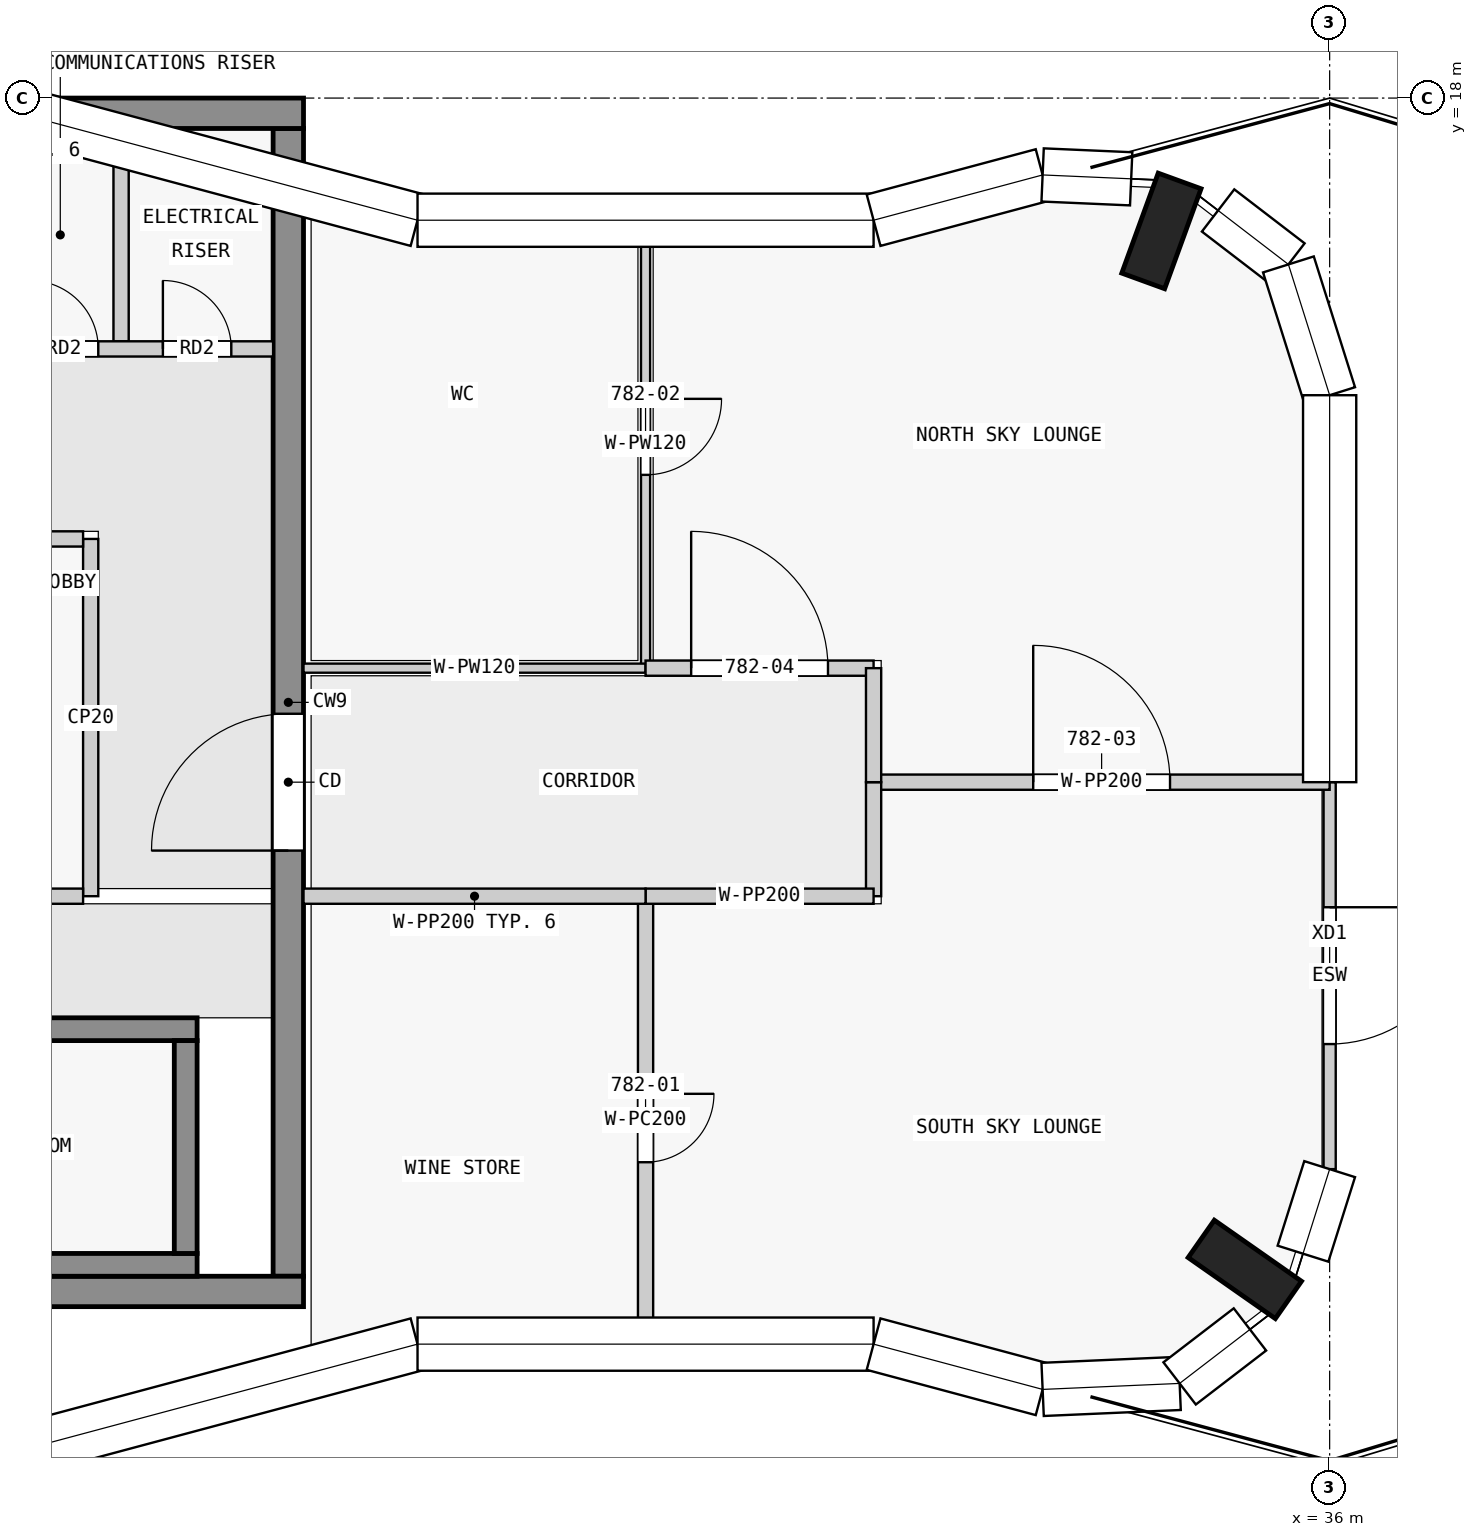
"""IFC4 building model, lengths in metres.
Left out: names, types, materials, properties, quantities, classifications, styles, units other than length and angle.
Written with IfcOpenShell. Run it as: python <this file> out.ifc"""

import sys

from ifc_helpers import new_model, si_unit, direction, frame, frame_2d, origin, origin_2d, place, context, subcontext, project, spatial, rectangle, extrude, element, fill, save


model = new_model("IFC4")
c1 = context("Model", 3, precision=1e-05, world=origin(), true_north=direction((0.0, 1.0)))
c2 = subcontext(c1, "Body", "Model", "MODEL_VIEW")
j1 = project(units=[si_unit("LENGTHUNIT", "METRE"), si_unit("PLANEANGLEUNIT", "RADIAN")], contexts=[c1])
p1 = place(None, origin())
s1 = spatial("IfcSite", under=j1, at=p1, CompositionType="ELEMENT")
p2 = place(p1, origin())
s2 = spatial("IfcBuilding", under=s1, at=p2, CompositionType="ELEMENT")
p3 = place(p2, frame((0.0, 0.0, 294.9)))
s3 = spatial("IfcBuildingStorey", under=s2, at=p3, CompositionType="ELEMENT", Elevation=294.9)
for number, where, z_axis, x_axis in (
    (1, (34.884, 2.59, 0.0), (0.0, 0.0, 1.0), (0.574, 0.819, 0.0)),
    (2, (33.787, 16.252, 0.0), (0.0, 0.0, 1.0), (-0.94, 0.342, 0.0)),
):
    element("IfcColumn", number, at=place(p3, frame(where, z_axis=z_axis, x_axis=x_axis)), inside=s3, PredefinedType="COLUMN", context=c2, shape_type="SweptSolid", body=[
        extrude(rectangle(XDim=0.6, YDim=1.4, at=origin_2d()), origin(), (0.0, 0.0, 1.0), 3.5),
    ])
for number, where, z_axis, x_axis in (
    (3, (1.9, 2.3, 0.0), (0.0, 0.0, 1.0), (1.0, 0.0, 0.0)),
    (4, (1.9, 17.8, 0.0), (0.0, 0.0, 1.0), (1.0, 0.0, 0.0)),
):
    element("IfcWall", number, at=place(p3, frame(where, z_axis=z_axis, x_axis=x_axis)), inside=s3, PredefinedType="SHEAR", context=c2, shape_type="SweptSolid", body=[
        extrude(rectangle(XDim=20.6, YDim=0.4, at=frame_2d((10.3, 0.0))), origin(), (0.0, 0.0, 1.0), 3.25),
    ])
p4 = place(p3, frame((22.3, 2.5, 0.0), z_axis=(0.0, 0.0, 1.0), x_axis=(0.0, 1.0, 0.0)))
e5 = element("IfcWall", 5, at=p4, inside=s3, PredefinedType="SHEAR", context=c2, shape_type="SweptSolid", body=[
    extrude(rectangle(XDim=15.1, YDim=0.4, at=frame_2d((7.55, 0.0))), origin(), (0.0, 0.0, 1.0), 3.25),
])
p5 = place(p4, frame((5.6, 0.0, 0.0)))
e6 = element("IfcOpeningElement", 6, at=p5, cuts=e5, PredefinedType="OPENING", context=c2, shape_type="SweptSolid", body=[
    extrude(rectangle(XDim=1.8, YDim=2.1, at=frame_2d((0.9, 1.05))), frame((0.0, 0.21, 0.0), z_axis=(0.0, -1.0, 0.0), x_axis=(1.0, 0.0, 0.0)), (0.0, 0.0, 1.0), 0.42),
])
p6 = place(p3, frame((13.3, 2.65, 0.0), z_axis=(0.0, 0.0, 1.0), x_axis=(1.0, 0.0, 0.0)))
e7 = element("IfcWall", 7, at=p6, inside=s3, PredefinedType="SHEAR", context=c2, shape_type="SweptSolid", body=[
    extrude(rectangle(XDim=7.8, YDim=0.3, at=frame_2d((3.9, 0.0))), origin(), (0.0, 0.0, 1.0), 3.25),
])
p7 = place(p3, frame((20.95, 2.8, 0.0), z_axis=(0.0, 0.0, 1.0), x_axis=(0.0, 1.0, 0.0)))
e8 = element("IfcWall", 8, at=p7, inside=s3, PredefinedType="SHEAR", context=c2, shape_type="SweptSolid", body=[
    extrude(rectangle(XDim=2.8, YDim=0.3, at=frame_2d((1.4, 0.0))), origin(), (0.0, 0.0, 1.0), 3.25),
])
p8 = place(p3, frame((2.3, 5.75, 0.0), z_axis=(0.0, 0.0, 1.0), x_axis=(1.0, 0.0, 0.0)))
e9 = element("IfcWall", 9, at=p8, inside=s3, PredefinedType="SHEAR", context=c2, shape_type="SweptSolid", body=[
    extrude(rectangle(XDim=18.8, YDim=0.3, at=frame_2d((9.4, 0.0))), origin(), (0.0, 0.0, 1.0), 3.25),
])
p9 = place(p8, frame((4.65, 0.0, 0.0)))
e10 = element("IfcOpeningElement", 10, at=p9, cuts=e9, PredefinedType="OPENING", context=c2, shape_type="SweptSolid", body=[
    extrude(rectangle(XDim=1.1, YDim=2.1, at=frame_2d((0.55, 1.05))), frame((0.0, 0.16, 0.0), z_axis=(0.0, -1.0, 0.0), x_axis=(1.0, 0.0, 0.0)), (0.0, 0.0, 1.0), 0.32),
])
p10 = place(p8, frame((0.45, 0.0, 0.0)))
e11 = element("IfcOpeningElement", 11, at=p10, cuts=e9, PredefinedType="OPENING", context=c2, shape_type="SweptSolid", body=[
    extrude(rectangle(XDim=1.1, YDim=2.1, at=frame_2d((0.55, 1.05))), frame((0.0, 0.16, 0.0), z_axis=(0.0, -1.0, 0.0), x_axis=(1.0, 0.0, 0.0)), (0.0, 0.0, 1.0), 0.32),
])
p11 = place(p8, frame((2.75, 0.0, 0.0)))
e12 = element("IfcOpeningElement", 12, at=p11, cuts=e9, PredefinedType="OPENING", context=c2, shape_type="SweptSolid", body=[
    extrude(rectangle(XDim=1.1, YDim=2.1, at=frame_2d((0.55, 1.05))), frame((0.0, 0.16, 0.0), z_axis=(0.0, -1.0, 0.0), x_axis=(1.0, 0.0, 0.0)), (0.0, 0.0, 1.0), 0.32),
])
p12 = place(p8, frame((11.95, 0.0, 0.0)))
e13 = element("IfcOpeningElement", 13, at=p12, cuts=e9, PredefinedType="OPENING", context=c2, shape_type="SweptSolid", body=[
    extrude(rectangle(XDim=0.9, YDim=2.1, at=frame_2d((0.45, 1.05))), frame((0.0, 0.16, 0.0), z_axis=(0.0, -1.0, 0.0), x_axis=(1.0, 0.0, 0.0)), (0.0, 0.0, 1.0), 0.32),
])
p13 = place(p8, frame((15.7, 0.0, 0.0)))
e14 = element("IfcOpeningElement", 14, at=p13, cuts=e9, PredefinedType="OPENING", context=c2, shape_type="SweptSolid", body=[
    extrude(rectangle(XDim=0.9, YDim=2.1, at=frame_2d((0.45, 1.05))), frame((0.0, 0.16, 0.0), z_axis=(0.0, -1.0, 0.0), x_axis=(1.0, 0.0, 0.0)), (0.0, 0.0, 1.0), 0.32),
])
p14 = place(p3, frame((36.0, 9.0, 0.0), z_axis=(0.0, 0.0, 1.0), x_axis=(0.0, -1.0, 0.0)))
e15 = element("IfcWall", 15, at=p14, inside=s3, PredefinedType="STANDARD", context=c2, shape_type="SweptSolid", body=[
    extrude(rectangle(XDim=5.091, YDim=0.16, at=frame_2d((2.545, 0.0))), origin(), (0.0, 0.0, 1.0), 3.25),
])
p15 = place(p14, frame((1.646, 0.0, 0.0)))
e16 = element("IfcOpeningElement", 16, at=p15, cuts=e15, PredefinedType="OPENING", context=c2, shape_type="SweptSolid", body=[
    extrude(rectangle(XDim=1.8, YDim=2.4, at=frame_2d((0.9, 1.2))), frame((0.0, 0.09, 0.0), z_axis=(0.0, -1.0, 0.0), x_axis=(1.0, 0.0, 0.0)), (0.0, 0.0, 1.0), 0.18),
])
p16 = place(p3, frame((10.9, 7.5, 0.0), z_axis=(0.0, 0.0, 1.0), x_axis=(1.0, 0.0, 0.0)))
e17 = element("IfcWall", 17, at=p16, inside=s3, PredefinedType="PARTITIONING", context=c2, shape_type="SweptSolid", body=[
    extrude(rectangle(XDim=8.7, YDim=0.2, at=frame_2d((4.35, 0.0))), origin(), (0.0, 0.0, 1.0), 3.25),
])
p17 = place(p3, frame((19.7, 7.5, 0.0), z_axis=(0.0, 0.0, 1.0), x_axis=(0.0, 1.0, 0.0)))
e18 = element("IfcWall", 18, at=p17, inside=s3, PredefinedType="PARTITIONING", context=c2, shape_type="SweptSolid", body=[
    extrude(rectangle(XDim=4.7, YDim=0.2, at=frame_2d((2.35, 0.0))), origin(), (0.0, 0.0, 1.0), 3.25),
])
p18 = place(p3, frame((10.9, 12.2, 0.0), z_axis=(0.0, 0.0, 1.0), x_axis=(1.0, 0.0, 0.0)))
e19 = element("IfcWall", 19, at=p18, inside=s3, PredefinedType="PARTITIONING", context=c2, shape_type="SweptSolid", body=[
    extrude(rectangle(XDim=8.7, YDim=0.2, at=frame_2d((4.35, 0.0))), origin(), (0.0, 0.0, 1.0), 3.25),
])
p19 = place(p18, frame((1.45, 0.0, 0.0)))
e20 = element("IfcOpeningElement", 20, at=p19, cuts=e19, PredefinedType="OPENING", context=c2, shape_type="SweptSolid", body=[
    extrude(rectangle(XDim=0.9, YDim=2.1, at=frame_2d((0.45, 1.05))), frame((0.0, 0.11, 0.0), z_axis=(0.0, -1.0, 0.0), x_axis=(1.0, 0.0, 0.0)), (0.0, 0.0, 1.0), 0.22),
])
p20 = place(p18, frame((5.9, 0.0, 0.0)))
e21 = element("IfcOpeningElement", 21, at=p20, cuts=e19, PredefinedType="OPENING", context=c2, shape_type="SweptSolid", body=[
    extrude(rectangle(XDim=0.9, YDim=2.1, at=frame_2d((0.45, 1.05))), frame((0.0, 0.11, 0.0), z_axis=(0.0, -1.0, 0.0), x_axis=(1.0, 0.0, 0.0)), (0.0, 0.0, 1.0), 0.22),
])
p21 = place(p3, frame((18.6, 14.7, 0.0), z_axis=(0.0, 0.0, 1.0), x_axis=(1.0, 0.0, 0.0)))
e22 = element("IfcWall", 22, at=p21, inside=s3, PredefinedType="PARTITIONING", context=c2, shape_type="SweptSolid", body=[
    extrude(rectangle(XDim=3.5, YDim=0.2, at=frame_2d((1.75, 0.0))), origin(), (0.0, 0.0, 1.0), 3.25),
])
p22 = place(p21, frame((0.3, 0.0, 0.0)))
e23 = element("IfcOpeningElement", 23, at=p22, cuts=e22, PredefinedType="OPENING", context=c2, shape_type="SweptSolid", body=[
    extrude(rectangle(XDim=0.9, YDim=2.1, at=frame_2d((0.45, 1.05))), frame((0.0, 0.11, 0.0), z_axis=(0.0, -1.0, 0.0), x_axis=(1.0, 0.0, 0.0)), (0.0, 0.0, 1.0), 0.22),
])
p23 = place(p21, frame((2.05, 0.0, 0.0)))
e24 = element("IfcOpeningElement", 24, at=p23, cuts=e22, PredefinedType="OPENING", context=c2, shape_type="SweptSolid", body=[
    extrude(rectangle(XDim=0.9, YDim=2.1, at=frame_2d((0.45, 1.05))), frame((0.0, 0.11, 0.0), z_axis=(0.0, -1.0, 0.0), x_axis=(1.0, 0.0, 0.0)), (0.0, 0.0, 1.0), 0.22),
])
p24 = place(p3, frame((20.1, 14.8, 0.0), z_axis=(0.0, 0.0, 1.0), x_axis=(0.0, 1.0, 0.0)))
e25 = element("IfcWall", 25, at=p24, inside=s3, PredefinedType="PARTITIONING", context=c2, shape_type="SweptSolid", body=[
    extrude(rectangle(XDim=2.8, YDim=0.2, at=frame_2d((1.4, 0.0))), origin(), (0.0, 0.0, 1.0), 3.25),
])
p25 = place(p3, frame((30.0, 9.0, 0.0), z_axis=(0.0, 0.0, 1.0), x_axis=(1.0, 0.0, 0.0)))
e26 = element("IfcWall", 26, at=p25, inside=s3, PredefinedType="PARTITIONING", context=c2, shape_type="SweptSolid", body=[
    extrude(rectangle(XDim=6.0, YDim=0.2, at=frame_2d((3.0, 0.0))), origin(), (0.0, 0.0, 1.0), 2.572),
])
p26 = place(p25, frame((2.1, 0.0, 0.0)))
e27 = element("IfcOpeningElement", 27, at=p26, cuts=e26, PredefinedType="OPENING", context=c2, shape_type="SweptSolid", body=[
    extrude(rectangle(XDim=1.8, YDim=2.1, at=frame_2d((0.9, 1.05))), frame((0.0, 0.11, 0.0), z_axis=(0.0, -1.0, 0.0), x_axis=(1.0, 0.0, 0.0)), (0.0, 0.0, 1.0), 0.22),
])
p27 = place(p3, frame((27.0, 16.393, 0.0), z_axis=(0.0, 0.0, 1.0), x_axis=(0.0, -1.0, 0.0)))
e28 = element("IfcWall", 28, at=p27, inside=s3, PredefinedType="PARTITIONING", context=c2, shape_type="SweptSolid", body=[
    extrude(rectangle(XDim=5.893, YDim=0.12, at=frame_2d((2.947, 0.0))), origin(), (0.0, 0.0, 1.0), 3.25),
])
p28 = place(p27, frame((2.35, 0.0, 0.0)))
e29 = element("IfcOpeningElement", 29, at=p28, cuts=e28, PredefinedType="OPENING", context=c2, shape_type="SweptSolid", body=[
    extrude(rectangle(XDim=1.0, YDim=2.1, at=frame_2d((0.5, 1.05))), frame((0.0, 0.07, 0.0), z_axis=(0.0, -1.0, 0.0), x_axis=(1.0, 0.0, 0.0)), (0.0, 0.0, 1.0), 0.14),
])
p29 = place(p3, frame((27.0, 7.5, 0.0), z_axis=(0.0, 0.0, 1.0), x_axis=(0.0, -1.0, 0.0)))
e30 = element("IfcWall", 30, at=p29, inside=s3, PredefinedType="PARTITIONING", context=c2, shape_type="SweptSolid", body=[
    extrude(rectangle(XDim=5.893, YDim=0.2, at=frame_2d((2.947, 0.0))), origin(), (0.0, 0.0, 1.0), 3.25),
])
p30 = place(p29, frame((2.6, 0.0, 0.0)))
e31 = element("IfcOpeningElement", 31, at=p30, cuts=e30, PredefinedType="OPENING", context=c2, shape_type="SweptSolid", body=[
    extrude(rectangle(XDim=0.9, YDim=2.1, at=frame_2d((0.45, 1.05))), frame((0.0, 0.11, 0.0), z_axis=(0.0, -1.0, 0.0), x_axis=(1.0, 0.0, 0.0)), (0.0, 0.0, 1.0), 0.22),
])
p31 = place(p3, frame((30.0, 9.0, 0.0), z_axis=(0.0, 0.0, 1.0), x_axis=(0.0, -1.0, 0.0)))
e32 = element("IfcWall", 32, at=p31, inside=s3, PredefinedType="PARTITIONING", context=c2, shape_type="SweptSolid", body=[
    extrude(rectangle(XDim=1.5, YDim=0.2, at=frame_2d((0.75, 0.0))), origin(), (0.0, 0.0, 1.0), 3.25),
])
p32 = place(p3, frame((30.0, 7.5, 0.0), z_axis=(0.0, 0.0, 1.0), x_axis=(-1.0, 0.0, 0.0)))
e33 = element("IfcWall", 33, at=p32, inside=s3, PredefinedType="PARTITIONING", context=c2, shape_type="SweptSolid", body=[
    extrude(rectangle(XDim=3.0, YDim=0.2, at=frame_2d((1.5, 0.0))), origin(), (0.0, 0.0, 1.0), 3.25),
])
p33 = place(p3, frame((22.5, 10.5, 0.0), z_axis=(0.0, 0.0, 1.0), x_axis=(1.0, 0.0, 0.0)))
e34 = element("IfcWall", 34, at=p33, inside=s3, PredefinedType="PARTITIONING", context=c2, shape_type="SweptSolid", body=[
    extrude(rectangle(XDim=4.5, YDim=0.12, at=frame_2d((2.25, 0.0))), origin(), (0.0, 0.0, 1.0), 3.25),
])
p34 = place(p3, frame((27.0, 7.5, 0.0), z_axis=(0.0, 0.0, 1.0), x_axis=(-1.0, 0.0, 0.0)))
e35 = element("IfcWall", 35, at=p34, inside=s3, PredefinedType="PARTITIONING", context=c2, shape_type="SweptSolid", body=[
    extrude(rectangle(XDim=4.5, YDim=0.2, at=frame_2d((2.25, 0.0))), origin(), (0.0, 0.0, 1.0), 3.25),
])
p35 = place(p3, frame((27.0, 10.5, 0.0), z_axis=(0.0, 0.0, 1.0), x_axis=(1.0, 0.0, 0.0)))
e36 = element("IfcWall", 36, at=p35, inside=s3, PredefinedType="PARTITIONING", context=c2, shape_type="SweptSolid", body=[
    extrude(rectangle(XDim=3.0, YDim=0.2, at=frame_2d((1.5, 0.0))), origin(), (0.0, 0.0, 1.0), 3.25),
])
p36 = place(p35, frame((0.6, 0.0, 0.0)))
e37 = element("IfcOpeningElement", 37, at=p36, cuts=e36, PredefinedType="OPENING", context=c2, shape_type="SweptSolid", body=[
    extrude(rectangle(XDim=1.8, YDim=2.1, at=frame_2d((0.9, 1.05))), frame((0.0, 0.11, 0.0), z_axis=(0.0, -1.0, 0.0), x_axis=(1.0, 0.0, 0.0)), (0.0, 0.0, 1.0), 0.22),
])
p37 = place(p3, frame((30.0, 10.5, 0.0), z_axis=(0.0, 0.0, 1.0), x_axis=(0.0, -1.0, 0.0)))
e38 = element("IfcWall", 38, at=p37, inside=s3, PredefinedType="PARTITIONING", context=c2, shape_type="SweptSolid", body=[
    extrude(rectangle(XDim=1.5, YDim=0.2, at=frame_2d((0.75, 0.0))), origin(), (0.0, 0.0, 1.0), 3.25),
])
p38 = place(p15, origin())
e39 = element("IfcDoor", 39, at=p38, inside=s3, OperationType="SINGLE_SWING_LEFT", PredefinedType="DOOR", context=c2, shape_type="SweptSolid", body=[
    extrude(rectangle(XDim=1.8, YDim=2.4, at=frame_2d((0.9, 1.2))), frame((0.0, 0.025, 0.0), z_axis=(0.0, -1.0, 0.0), x_axis=(1.0, 0.0, 0.0)), (0.0, 0.0, 1.0), 0.05),
])
fill(e16, e39)
p39 = place(p5, origin())
e40 = element("IfcDoor", 40, at=p39, inside=s3, OperationType="DOUBLE_DOOR_SINGLE_SWING", PredefinedType="DOOR", context=c2, shape_type="SweptSolid", body=[
    extrude(rectangle(XDim=1.8, YDim=2.1, at=frame_2d((0.9, 1.05))), frame((0.0, 0.025, 0.0), z_axis=(0.0, -1.0, 0.0), x_axis=(1.0, 0.0, 0.0)), (0.0, 0.0, 1.0), 0.05),
])
fill(e6, e40)
p40 = place(p22, origin())
e41 = element("IfcDoor", 41, at=p40, inside=s3, OperationType="SINGLE_SWING_LEFT", PredefinedType="DOOR", context=c2, shape_type="SweptSolid", body=[
    extrude(rectangle(XDim=0.9, YDim=2.1, at=frame_2d((0.45, 1.05))), frame((0.0, 0.025, 0.0), z_axis=(0.0, -1.0, 0.0), x_axis=(1.0, 0.0, 0.0)), (0.0, 0.0, 1.0), 0.05),
])
fill(e23, e41)
p41 = place(p23, origin())
e42 = element("IfcDoor", 42, at=p41, inside=s3, OperationType="SINGLE_SWING_LEFT", PredefinedType="DOOR", context=c2, shape_type="SweptSolid", body=[
    extrude(rectangle(XDim=0.9, YDim=2.1, at=frame_2d((0.45, 1.05))), frame((0.0, 0.025, 0.0), z_axis=(0.0, -1.0, 0.0), x_axis=(1.0, 0.0, 0.0)), (0.0, 0.0, 1.0), 0.05),
])
fill(e24, e42)
p42 = place(p30, origin())
e43 = element("IfcDoor", 43, at=p42, inside=s3, OperationType="SINGLE_SWING_LEFT", PredefinedType="DOOR", context=c2, shape_type="SweptSolid", body=[
    extrude(rectangle(XDim=0.9, YDim=2.1, at=frame_2d((0.45, 1.05))), frame((0.0, 0.025, 0.0), z_axis=(0.0, -1.0, 0.0), x_axis=(1.0, 0.0, 0.0)), (0.0, 0.0, 1.0), 0.05),
])
fill(e31, e43)
p43 = place(p28, origin())
e44 = element("IfcDoor", 44, at=p43, inside=s3, OperationType="SINGLE_SWING_LEFT", PredefinedType="DOOR", context=c2, shape_type="SweptSolid", body=[
    extrude(rectangle(XDim=1.0, YDim=2.1, at=frame_2d((0.5, 1.05))), frame((0.0, 0.025, 0.0), z_axis=(0.0, -1.0, 0.0), x_axis=(1.0, 0.0, 0.0)), (0.0, 0.0, 1.0), 0.05),
])
fill(e29, e44)
p44 = place(p26, origin())
e45 = element("IfcDoor", 45, at=p44, inside=s3, OperationType="DOUBLE_DOOR_SINGLE_SWING", PredefinedType="DOOR", context=c2, shape_type="SweptSolid", body=[
    extrude(rectangle(XDim=1.8, YDim=2.1, at=frame_2d((0.9, 1.05))), frame((0.0, 0.025, 0.0), z_axis=(0.0, -1.0, 0.0), x_axis=(1.0, 0.0, 0.0)), (0.0, 0.0, 1.0), 0.05),
])
fill(e27, e45)
p45 = place(p36, origin())
e46 = element("IfcDoor", 46, at=p45, inside=s3, OperationType="DOUBLE_DOOR_SINGLE_SWING", PredefinedType="DOOR", context=c2, shape_type="SweptSolid", body=[
    extrude(rectangle(XDim=1.8, YDim=2.1, at=frame_2d((0.9, 1.05))), frame((0.0, 0.025, 0.0), z_axis=(0.0, -1.0, 0.0), x_axis=(1.0, 0.0, 0.0)), (0.0, 0.0, 1.0), 0.05),
])
fill(e37, e46)
save(model, sys.argv[1])
